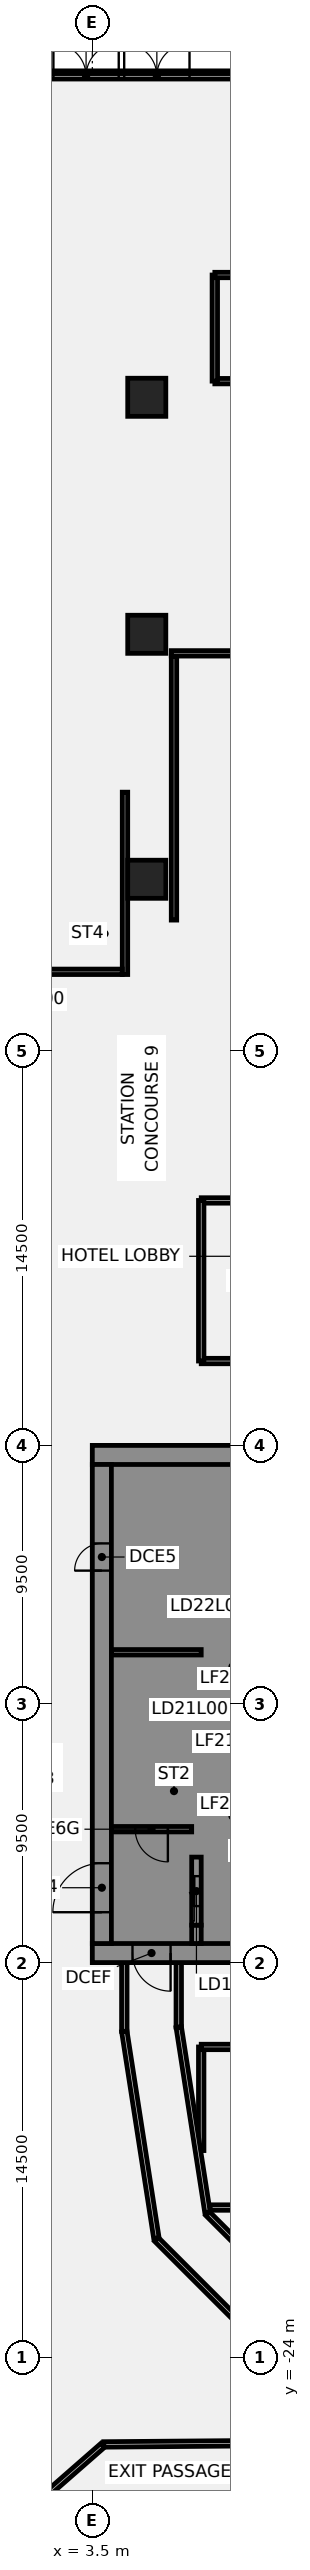
"""IFC4 building model, lengths in metres.
Left out: names, types, materials, properties, quantities, classifications, styles, units other than length and angle.
Written with IfcOpenShell. Run it as: python <this file> out.ifc"""

import sys

from ifc_helpers import new_model, si_unit, direction, frame, frame_2d, origin, origin_2d, place, context, subcontext, project, spatial, polyline, rectangle, outline, extrude, element, fill, save


model = new_model("IFC4")
c1 = context("Model", 3, precision=1e-05, world=origin(), true_north=direction((0.0, 1.0)))
c2 = subcontext(c1, "Body", "Model", "MODEL_VIEW")
j1 = project(units=[si_unit("LENGTHUNIT", "METRE"), si_unit("PLANEANGLEUNIT", "RADIAN")], contexts=[c1])
p1 = place(None, origin())
s1 = spatial("IfcSite", under=j1, at=p1, CompositionType="ELEMENT")
p2 = place(p1, origin())
s2 = spatial("IfcBuilding", under=s1, at=p2, CompositionType="ELEMENT")
p3 = place(p2, origin())
s3 = spatial("IfcBuildingStorey", under=s2, at=p3, CompositionType="ELEMENT", Elevation=0.0)
for number, where, z_axis, x_axis in (
    (1, (5.5, 39.3, -0.55), (0.0, 0.0, 1.0), (1.0, 0.0, 0.0)),
    (2, (5.5, 30.3, -0.55), (0.0, 0.0, 1.0), (1.0, 0.0, 0.0)),
    (3, (5.5, 48.008, -0.55), (0.0, 0.0, 1.0), (1.0, 0.0, 0.0)),
):
    element("IfcColumn", number, at=place(p3, frame(where, z_axis=z_axis, x_axis=x_axis)), inside=s3, PredefinedType="COLUMN", context=c2, shape_type="SweptSolid", body=[
        extrude(rectangle(XDim=1.4, YDim=1.4, at=origin_2d()), origin(), (0.0, 0.0, 1.0), 9.05),
    ])
p4 = place(p3, frame((8.0, 48.6, 0.0), z_axis=(0.0, 0.0, 1.0), x_axis=(1.0, 0.0, 0.0)))
e4 = element("IfcWall", 4, at=p4, inside=s3, PredefinedType="PARTITIONING", context=c2, shape_type="SweptSolid", body=[
    extrude(rectangle(XDim=11.5, YDim=0.2, at=frame_2d((5.75, 0.0))), origin(), (0.0, 0.0, 1.0), 8.5),
])
p5 = place(p4, frame((9.94, 0.0, 0.0)))
e5 = element("IfcOpeningElement", 5, at=p5, cuts=e4, PredefinedType="OPENING", context=c2, shape_type="SweptSolid", body=[
    extrude(rectangle(XDim=1.2, YDim=2.1, at=frame_2d((0.6, 1.05))), frame((0.0, 0.11, 0.0), z_axis=(0.0, -1.0, 0.0), x_axis=(1.0, 0.0, 0.0)), (0.0, 0.0, 1.0), 0.22),
])
p6 = place(p3, frame((8.0, 48.6, 0.0), z_axis=(0.0, 0.0, 1.0), x_axis=(0.0, 1.0, 0.0)))
e6 = element("IfcWall", 6, at=p6, inside=s3, PredefinedType="PARTITIONING", context=c2, shape_type="SweptSolid", body=[
    extrude(rectangle(XDim=3.9, YDim=0.2, at=frame_2d((1.95, 0.0))), origin(), (0.0, 0.0, 1.0), 8.5),
])
p7 = place(p3, frame((8.0, 52.5, 0.0), z_axis=(0.0, 0.0, 1.0), x_axis=(1.0, 0.0, 0.0)))
e7 = element("IfcWall", 7, at=p7, inside=s3, PredefinedType="PARTITIONING", context=c2, shape_type="SweptSolid", body=[
    extrude(rectangle(XDim=11.5, YDim=0.2, at=frame_2d((5.75, 0.0))), origin(), (0.0, 0.0, 1.0), 8.5),
])
for number, where, z_axis, x_axis in (
    (8, (7.5, 18.5, 0.0), (0.0, 0.0, 1.0), (1.0, 0.0, 0.0)),
    (9, (7.5, 12.6, 0.0), (0.0, 0.0, 1.0), (1.0, 0.0, 0.0)),
):
    element("IfcWall", number, at=place(p3, frame(where, z_axis=z_axis, x_axis=x_axis)), inside=s3, PredefinedType="PARTITIONING", context=c2, shape_type="SweptSolid", body=[
        extrude(rectangle(XDim=5.5, YDim=0.2, at=frame_2d((2.75, 0.0))), origin(), (0.0, 0.0, 1.0), 8.5),
    ])
p8 = place(p3, frame((7.5, 12.6, 0.0), z_axis=(0.0, 0.0, 1.0), x_axis=(0.0, 1.0, 0.0)))
e10 = element("IfcWall", 10, at=p8, inside=s3, PredefinedType="PARTITIONING", context=c2, shape_type="SweptSolid", body=[
    extrude(rectangle(XDim=5.9, YDim=0.2, at=frame_2d((2.95, 0.0))), origin(), (0.0, 0.0, 1.0), 8.5),
])
p9 = place(p3, frame((7.825, -18.5, 0.0), z_axis=(0.0, 0.0, 1.0), x_axis=(1.0, 0.0, 0.0)))
e11 = element("IfcWall", 11, at=p9, inside=s3, PredefinedType="PARTITIONING", context=c2, shape_type="SweptSolid", body=[
    extrude(rectangle(XDim=5.175, YDim=0.2, at=frame_2d((2.588, 0.0))), origin(), (0.0, 0.0, 1.0), 8.5),
])
p10 = place(p3, frame((7.5, -16.407, 0.0), z_axis=(0.0, 0.0, 1.0), x_axis=(0.0, 1.0, 0.0)))
e12 = element("IfcWall", 12, at=p10, inside=s3, PredefinedType="PARTITIONING", context=c2, shape_type="SweptSolid", body=[
    extrude(rectangle(XDim=3.807, YDim=0.2, at=frame_2d((1.903, 0.0))), origin(), (0.0, 0.0, 1.0), 8.5),
])
p11 = place(p3, frame((7.5, -12.6, 0.0), z_axis=(0.0, 0.0, 1.0), x_axis=(1.0, 0.0, 0.0)))
e13 = element("IfcWall", 13, at=p11, inside=s3, PredefinedType="PARTITIONING", context=c2, shape_type="SweptSolid", body=[
    extrude(rectangle(XDim=5.5, YDim=0.2, at=frame_2d((2.75, 0.0))), origin(), (0.0, 0.0, 1.0), 8.5),
])
p12 = place(p3, frame((1.124, -29.65, 0.0), z_axis=(0.0, 0.0, 1.0), x_axis=(0.752593197415, 0.658485747154, 0.0)))
e14 = element("IfcWall", 14, at=p12, inside=s3, PredefinedType="PARTITIONING", context=c2, shape_type="SweptSolid", body=[
    extrude(rectangle(XDim=3.666, YDim=0.2, at=frame_2d((1.833, 0.0))), origin(), (0.0, 0.0, 1.0), 8.5),
])
p13 = place(p3, frame((3.921, -27.203, 0.0), z_axis=(0.0, 0.0, 1.0), x_axis=(0.999965985762, 0.008247867521, 0.0)))
e15 = element("IfcWall", 15, at=p13, inside=s3, PredefinedType="PARTITIONING", context=c2, shape_type="SweptSolid", body=[
    extrude(rectangle(XDim=12.491, YDim=0.2, at=frame_2d((6.246, 0.0))), origin(), (0.0, 0.0, 1.0), 8.5),
])
p14 = place(p3, frame((6.675, -9.5, 0.0), z_axis=(0.0, 0.0, 1.0), x_axis=(0.0, -1.0, 0.0)))
e16 = element("IfcWall", 16, at=p14, inside=s3, PredefinedType="PARTITIONING", context=c2, shape_type="SweptSolid", body=[
    extrude(rectangle(XDim=2.373, YDim=0.2, at=frame_2d((1.187, 0.0))), origin(), (0.0, 0.0, 1.0), 8.5),
])
p15 = place(p3, frame((6.675, -11.873, 0.0), z_axis=(0.0, 0.0, 1.0), x_axis=(0.153333746866, -0.98817445933, 0.0)))
e17 = element("IfcWall", 17, at=p15, inside=s3, PredefinedType="PARTITIONING", context=c2, shape_type="SweptSolid", body=[
    extrude(rectangle(XDim=6.883, YDim=0.2, at=frame_2d((3.441, 0.0))), origin(), (0.0, 0.0, 1.0), 8.5),
])
p16 = place(p3, frame((7.738, -18.724, 0.0), z_axis=(0.0, 0.0, 1.0), x_axis=(0.707121343443, -0.70709221863, 0.0)))
e18 = element("IfcWall", 18, at=p16, inside=s3, PredefinedType="PARTITIONING", context=c2, shape_type="SweptSolid", body=[
    extrude(rectangle(XDim=8.383, YDim=0.2, at=frame_2d((4.191, 0.0))), origin(), (0.0, 0.0, 1.0), 8.5),
])
p17 = place(p3, frame((4.675, -9.5, 0.0), z_axis=(0.0, 0.0, 1.0), x_axis=(0.0, -1.0, 0.0)))
e19 = element("IfcWall", 19, at=p17, inside=s3, PredefinedType="PARTITIONING", context=c2, shape_type="SweptSolid", body=[
    extrude(rectangle(XDim=2.527, YDim=0.2, at=frame_2d((1.264, 0.0))), origin(), (0.0, 0.0, 1.0), 8.5),
])
p18 = place(p3, frame((4.675, -12.027, 0.0), z_axis=(0.0, 0.0, 1.0), x_axis=(0.153330916217, -0.988174898554, 0.0)))
e20 = element("IfcWall", 20, at=p18, inside=s3, PredefinedType="PARTITIONING", context=c2, shape_type="SweptSolid", body=[
    extrude(rectangle(XDim=7.69, YDim=0.2, at=frame_2d((3.845, 0.0))), origin(), (0.0, 0.0, 1.0), 8.5),
])
p19 = place(p3, frame((5.862, -19.676, 0.0), z_axis=(0.0, 0.0, 1.0), x_axis=(0.707106781187, -0.707106781187, 0.0)))
e21 = element("IfcWall", 21, at=p19, inside=s3, PredefinedType="PARTITIONING", context=c2, shape_type="SweptSolid", body=[
    extrude(rectangle(XDim=9.902, YDim=0.2, at=frame_2d((4.951, 0.0))), origin(), (0.0, 0.0, 1.0), 8.5),
])
p20 = place(p3, frame((6.5, 28.8, 0.0), z_axis=(0.0, 0.0, 1.0), x_axis=(0.0, 1.0, 0.0)))
e22 = element("IfcWall", 22, at=p20, inside=s3, PredefinedType="SOLIDWALL", context=c2, shape_type="SweptSolid", body=[
    extrude(rectangle(XDim=9.7, YDim=0.2, at=frame_2d((4.85, 0.0))), origin(), (0.0, 0.0, 1.0), 8.5),
])
p21 = place(p3, frame((10.7, 38.6, 0.0), z_axis=(0.0, 0.0, 1.0), x_axis=(-1.0, 0.0, 0.0)))
e23 = element("IfcWall", 23, at=p21, inside=s3, PredefinedType="SOLIDWALL", context=c2, shape_type="SweptSolid", body=[
    extrude(rectangle(XDim=4.3, YDim=0.2, at=frame_2d((2.15, 0.0))), origin(), (0.0, 0.0, 1.0), 8.5),
])
p22 = place(p3, frame((9.101, 59.8, 0.0), z_axis=(0.0, 0.0, 1.0), x_axis=(-1.0, 0.0, 0.0)))
e24 = element("IfcWall", 24, at=p22, inside=s3, PredefinedType="SOLIDWALL", context=c2, shape_type="SweptSolid", body=[
    extrude(rectangle(XDim=9.061, YDim=0.2, at=frame_2d((4.53, 0.0))), origin(), (0.0, 0.0, 1.0), 2.9),
])
p23 = place(p22, frame((2.03, 0.0, 0.0)))
e25 = element("IfcOpeningElement", 25, at=p23, cuts=e24, PredefinedType="OPENING", context=c2, shape_type="SweptSolid", body=[
    extrude(rectangle(XDim=2.4, YDim=2.4, at=frame_2d((1.2, 1.2))), frame((0.0, 0.11, 0.0), z_axis=(0.0, -1.0, 0.0), x_axis=(1.0, 0.0, 0.0)), (0.0, 0.0, 1.0), 0.22),
])
p24 = place(p22, frame((4.63, 0.0, 0.0)))
e26 = element("IfcOpeningElement", 26, at=p24, cuts=e24, PredefinedType="OPENING", context=c2, shape_type="SweptSolid", body=[
    extrude(rectangle(XDim=2.4, YDim=2.4, at=frame_2d((1.2, 1.2))), frame((0.0, 0.11, 0.0), z_axis=(0.0, -1.0, 0.0), x_axis=(1.0, 0.0, 0.0)), (0.0, 0.0, 1.0), 0.22),
])
p25 = place(p3, frame((16.5, -9.15, 0.0), z_axis=(0.0, 0.0, 1.0), x_axis=(-1.0, 0.0, 0.0)))
e27 = element("IfcWall", 27, at=p25, inside=s3, PredefinedType="SHEAR", context=c2, shape_type="SweptSolid", body=[
    extrude(rectangle(XDim=13.0, YDim=0.7, at=frame_2d((6.5, 0.0))), origin(), (0.0, 0.0, 1.0), 8.5),
])
p26 = place(p25, frame((4.15, 0.0, 0.0)))
e28 = element("IfcOpeningElement", 28, at=p26, cuts=e27, PredefinedType="OPENING", context=c2, shape_type="SweptSolid", body=[
    extrude(rectangle(XDim=1.4, YDim=2.1, at=frame_2d((0.7, 1.05))), frame((0.0, 0.36, 0.0), z_axis=(0.0, -1.0, 0.0), x_axis=(1.0, 0.0, 0.0)), (0.0, 0.0, 1.0), 0.72),
])
p27 = place(p25, frame((10.125, 0.0, 0.0)))
e29 = element("IfcOpeningElement", 29, at=p27, cuts=e27, PredefinedType="OPENING", context=c2, shape_type="SweptSolid", body=[
    extrude(rectangle(XDim=1.4, YDim=2.1, at=frame_2d((0.7, 1.05))), frame((0.0, 0.36, 0.0), z_axis=(0.0, -1.0, 0.0), x_axis=(1.0, 0.0, 0.0)), (0.0, 0.0, 1.0), 0.72),
])
p28 = place(p3, frame((16.5, 9.15, 0.0), z_axis=(0.0, 0.0, 1.0), x_axis=(-1.0, 0.0, 0.0)))
e30 = element("IfcWall", 30, at=p28, inside=s3, PredefinedType="SHEAR", context=c2, shape_type="SweptSolid", body=[
    extrude(rectangle(XDim=13.0, YDim=0.7, at=frame_2d((6.5, 0.0))), origin(), (0.0, 0.0, 1.0), 8.5),
])
p29 = place(p28, frame((4.15, 0.0, 0.0)))
e31 = element("IfcOpeningElement", 31, at=p29, cuts=e30, PredefinedType="OPENING", context=c2, shape_type="SweptSolid", body=[
    extrude(rectangle(XDim=1.4, YDim=2.1, at=frame_2d((0.7, 1.05))), frame((0.0, 0.36, 0.0), z_axis=(0.0, -1.0, 0.0), x_axis=(1.0, 0.0, 0.0)), (0.0, 0.0, 1.0), 0.72),
])
p30 = place(p3, origin())
e32 = element("IfcWall", 32, at=p30, inside=s3, PredefinedType="SHEAR", context=c2, shape_type="SweptSolid", body=[
    extrude(outline(polyline([(9.8, -5.375), (7.5, -5.375), (7.5, -2.875), (9.8, -2.875), (9.8, -2.625), (7.5, -2.625), (7.5, -0.125), (9.8, -0.125), (9.8, 0.125), (7.5, 0.125), (7.5, 2.625), (9.8, 2.625), (9.8, 2.875), (7.5, 2.875), (7.5, 5.375), (9.8, 5.375), (9.8, 5.625), (7.5, 5.625), (7.5, 8.125), (9.8, 8.125), (9.8, 8.8), (7.5, 8.8), (7.15, 8.8), (7.15, -5.625), (7.5, -5.625), (9.8, -5.625), (9.8, -5.375)])), origin(), (0.0, 0.0, 1.0), 8.5),
])
p31 = place(p3, origin())
e33 = element("IfcWall", 33, at=p31, inside=s3, PredefinedType="SHEAR", context=c2, shape_type="SweptSolid", body=[
    extrude(outline(polyline([(7.5, -8.125), (7.5, -8.8), (9.8, -8.8), (9.8, -8.125), (9.8, -5.625), (9.55, -5.625), (9.55, -8.125), (7.5, -8.125)])), origin(), (0.0, 0.0, 1.0), 8.5),
])
p32 = place(p3, frame((7.325, -8.8, 0.0), z_axis=(0.0, 0.0, 1.0), x_axis=(0.0, 1.0, 0.0)))
e34 = element("IfcWall", 34, at=p32, inside=s3, PredefinedType="SHEAR", context=c2, shape_type="SweptSolid", body=[
    extrude(rectangle(XDim=0.675, YDim=0.35, at=frame_2d((0.337, 0.0))), origin(), (0.0, 0.0, 1.0), 8.5),
])
p33 = place(p3, frame((7.5, 1.9, 0.0), z_axis=(0.0, 0.0, 1.0), x_axis=(-1.0, 0.0, 0.0)))
e35 = element("IfcWall", 35, at=p33, inside=s3, PredefinedType="SHEAR", context=c2, shape_type="SweptSolid", body=[
    extrude(rectangle(XDim=3.3, YDim=0.2, at=frame_2d((1.65, 0.0))), origin(), (0.0, 0.0, 1.0), 8.5),
])
p34 = place(p3, frame((7.325, -8.125, 0.0), z_axis=(0.0, 0.0, 1.0), x_axis=(0.0, 1.0, 0.0)))
e36 = element("IfcWall", 36, at=p34, inside=s3, PredefinedType="SHEAR", context=c2, shape_type="SweptSolid", body=[
    extrude(rectangle(XDim=2.5, YDim=0.35, at=frame_2d((1.25, 0.0))), origin(), (0.0, 0.0, 1.0), 8.5),
])
p35 = place(p34, frame((0.7, 0.0, 0.0)))
e37 = element("IfcOpeningElement", 37, at=p35, cuts=e36, PredefinedType="OPENING", context=c2, shape_type="SweptSolid", body=[
    extrude(rectangle(XDim=1.1, YDim=2.1, at=frame_2d((0.55, 1.05))), frame((0.0, 0.185, 0.0), z_axis=(0.0, -1.0, 0.0), x_axis=(1.0, 0.0, 0.0)), (0.0, 0.0, 1.0), 0.37),
])
p36 = place(p3, frame((3.85, -8.8, 0.0), z_axis=(0.0, 0.0, 1.0), x_axis=(0.0, 1.0, 0.0)))
e38 = element("IfcWall", 38, at=p36, inside=s3, PredefinedType="SHEAR", context=c2, shape_type="SweptSolid", body=[
    extrude(rectangle(XDim=17.6, YDim=0.7, at=frame_2d((8.8, 0.0))), origin(), (0.0, 0.0, 1.0), 8.5),
])
p37 = place(p36, frame((1.15, 0.0, 0.0)))
e39 = element("IfcOpeningElement", 39, at=p37, cuts=e38, PredefinedType="OPENING", context=c2, shape_type="SweptSolid", body=[
    extrude(rectangle(XDim=1.8, YDim=2.1, at=frame_2d((0.9, 1.05))), frame((0.0, 0.36, 0.0), z_axis=(0.0, -1.0, 0.0), x_axis=(1.0, 0.0, 0.0)), (0.0, 0.0, 1.0), 0.72),
])
p38 = place(p36, frame((13.7, 0.0, 0.0)))
e40 = element("IfcOpeningElement", 40, at=p38, cuts=e38, PredefinedType="OPENING", context=c2, shape_type="SweptSolid", body=[
    extrude(rectangle(XDim=1.0, YDim=2.1, at=frame_2d((0.5, 1.05))), frame((0.0, 0.36, 0.0), z_axis=(0.0, -1.0, 0.0), x_axis=(1.0, 0.0, 0.0)), (0.0, 0.0, 1.0), 0.72),
])
p39 = place(p3, frame((7.15, -4.6, 0.0), z_axis=(0.0, 0.0, 1.0), x_axis=(-1.0, 0.0, 0.0)))
e41 = element("IfcWall", 41, at=p39, inside=s3, PredefinedType="SHEAR", context=c2, shape_type="SweptSolid", body=[
    extrude(rectangle(XDim=2.95, YDim=0.2, at=frame_2d((1.475, 0.0))), origin(), (0.0, 0.0, 1.0), 8.5),
])
p40 = place(p39, frame((0.875, 0.0, 0.0)))
e42 = element("IfcOpeningElement", 42, at=p40, cuts=e41, PredefinedType="OPENING", context=c2, shape_type="SweptSolid", body=[
    extrude(rectangle(XDim=1.2, YDim=2.1, at=frame_2d((0.6, 1.05))), frame((0.0, 0.11, 0.0), z_axis=(0.0, -1.0, 0.0), x_axis=(1.0, 0.0, 0.0)), (0.0, 0.0, 1.0), 0.22),
])
p41 = place(p3, frame((4.7, 26.8, 0.0), z_axis=(0.0, 0.0, 1.0), x_axis=(0.0, 1.0, 0.0)))
e43 = element("IfcWall", 43, at=p41, inside=s3, PredefinedType="SHEAR", context=c2, shape_type="SweptSolid", body=[
    extrude(rectangle(XDim=6.7, YDim=0.2, at=frame_2d((3.35, 0.0))), origin(), (0.0, 0.0, 1.0), 8.5),
])
p42 = place(p3, frame((4.6, 26.9, 0.0), z_axis=(0.0, 0.0, 1.0), x_axis=(-1.0, 0.0, 0.0)))
e44 = element("IfcWall", 44, at=p42, inside=s3, PredefinedType="SHEAR", context=c2, shape_type="SweptSolid", body=[
    extrude(rectangle(XDim=3.2, YDim=0.2, at=frame_2d((1.6, 0.0))), origin(), (0.0, 0.0, 1.0), 8.5),
])
p43 = place(p3, origin())
e45 = element("IfcWall", 45, at=p43, inside=s3, PredefinedType="SHEAR", context=c2, shape_type="SweptSolid", body=[
    extrude(outline(polyline([(4.6, 33.3), (4.6, 33.5), (1.4, 33.5), (1.4, 33.3), (4.6, 33.3)])), origin(), (0.0, 0.0, 1.0), 8.5),
])
p44 = place(p23, frame((2.4, 0.0, 0.0), z_axis=(0.0, 0.0, 1.0), x_axis=(-1.0, 0.0, 0.0)))
e46 = element("IfcDoor", 46, at=p44, inside=s3, OperationType="DOUBLE_DOOR_DOUBLE_SWING", PredefinedType="DOOR", context=c2, shape_type="SweptSolid", body=[
    extrude(rectangle(XDim=2.4, YDim=2.4, at=frame_2d((1.2, 1.2))), frame((0.0, 0.025, 0.0), z_axis=(0.0, -1.0, 0.0), x_axis=(1.0, 0.0, 0.0)), (0.0, 0.0, 1.0), 0.05),
])
fill(e25, e46)
p45 = place(p24, frame((2.4, 0.0, 0.0), z_axis=(0.0, 0.0, 1.0), x_axis=(-1.0, 0.0, 0.0)))
e47 = element("IfcDoor", 47, at=p45, inside=s3, OperationType="DOUBLE_DOOR_DOUBLE_SWING", PredefinedType="DOOR", context=c2, shape_type="SweptSolid", body=[
    extrude(rectangle(XDim=2.4, YDim=2.4, at=frame_2d((1.2, 1.2))), frame((0.0, 0.025, 0.0), z_axis=(0.0, -1.0, 0.0), x_axis=(1.0, 0.0, 0.0)), (0.0, 0.0, 1.0), 0.05),
])
fill(e26, e47)
p46 = place(p27, origin())
e48 = element("IfcDoor", 48, at=p46, inside=s3, OperationType="SINGLE_SWING_LEFT", PredefinedType="DOOR", context=c2, shape_type="SweptSolid", body=[
    extrude(rectangle(XDim=1.4, YDim=2.1, at=frame_2d((0.7, 1.05))), frame((0.0, 0.025, 0.0), z_axis=(0.0, -1.0, 0.0), x_axis=(1.0, 0.0, 0.0)), (0.0, 0.0, 1.0), 0.05),
])
fill(e29, e48)
p47 = place(p37, origin())
e49 = element("IfcDoor", 49, at=p47, inside=s3, OperationType="SINGLE_SWING_LEFT", PredefinedType="DOOR", context=c2, shape_type="SweptSolid", body=[
    extrude(rectangle(XDim=1.8, YDim=2.1, at=frame_2d((0.9, 1.05))), frame((0.0, 0.025, 0.0), z_axis=(0.0, -1.0, 0.0), x_axis=(1.0, 0.0, 0.0)), (0.0, 0.0, 1.0), 0.05),
])
fill(e39, e49)
p48 = place(p38, origin())
e50 = element("IfcDoor", 50, at=p48, inside=s3, OperationType="SINGLE_SWING_LEFT", PredefinedType="DOOR", context=c2, shape_type="SweptSolid", body=[
    extrude(rectangle(XDim=1.0, YDim=2.1, at=frame_2d((0.5, 1.05))), frame((0.0, 0.025, 0.0), z_axis=(0.0, -1.0, 0.0), x_axis=(1.0, 0.0, 0.0)), (0.0, 0.0, 1.0), 0.05),
])
fill(e40, e50)
p49 = place(p40, origin())
e51 = element("IfcDoor", 51, at=p49, inside=s3, OperationType="SINGLE_SWING_LEFT", PredefinedType="DOOR", context=c2, shape_type="SweptSolid", body=[
    extrude(rectangle(XDim=1.2, YDim=2.1, at=frame_2d((0.6, 1.05))), frame((0.0, 0.025, 0.0), z_axis=(0.0, -1.0, 0.0), x_axis=(1.0, 0.0, 0.0)), (0.0, 0.0, 1.0), 0.05),
])
fill(e42, e51)
p50 = place(p35, origin())
e52 = element("IfcDoor", 52, at=p50, inside=s3, OperationType="SLIDING_TO_LEFT", PredefinedType="DOOR", context=c2, shape_type="SweptSolid", body=[
    extrude(rectangle(XDim=1.1, YDim=2.1, at=frame_2d((0.55, 1.05))), frame((0.0, 0.025, 0.0), z_axis=(0.0, -1.0, 0.0), x_axis=(1.0, 0.0, 0.0)), (0.0, 0.0, 1.0), 0.05),
])
fill(e37, e52)
save(model, sys.argv[1])
